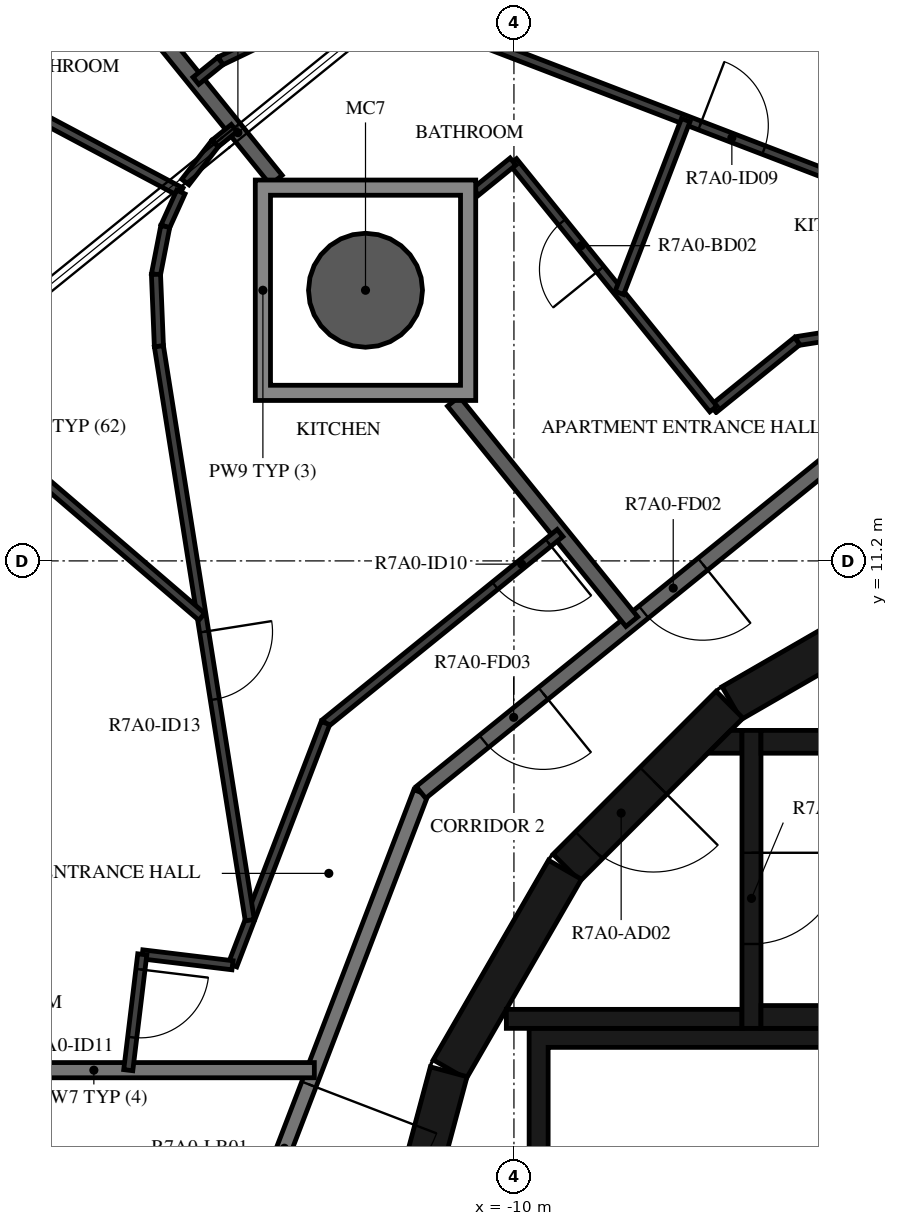
"""IFC4 building model, lengths in metres.
Left out: names, types, materials, properties, quantities, classifications, styles, units other than length and angle.
Written with IfcOpenShell. Run it as: python <this file> out.ifc"""

import sys

from ifc_helpers import new_model, si_unit, direction, frame, frame_2d, origin, origin_2d, place, context, subcontext, project, spatial, polyline, rectangle, hollow_circle, outline, extrude, element, fill, save


model = new_model("IFC4")
c1 = context("Model", 3, precision=1e-05, world=origin(), true_north=direction((0.0, 1.0)))
c2 = subcontext(c1, "Body", "Model", "MODEL_VIEW")
j1 = project(units=[si_unit("LENGTHUNIT", "METRE"), si_unit("PLANEANGLEUNIT", "RADIAN")], contexts=[c1])
p1 = place(None, origin())
s1 = spatial("IfcSite", under=j1, at=p1, CompositionType="ELEMENT")
p2 = place(p1, origin())
s2 = spatial("IfcBuilding", under=s1, at=p2, CompositionType="ELEMENT")
p3 = place(p2, frame((0.0, 0.0, 270.4)))
s3 = spatial("IfcBuildingStorey", under=s2, at=p3, CompositionType="ELEMENT", Elevation=270.4)
p4 = place(p3, frame((-11.953, 14.76, -0.38), z_axis=(0.0, 0.0, 1.0), x_axis=(1.0, 0.0, 0.0)))
e1 = element("IfcColumn", 1, at=p4, inside=s3, PredefinedType="COLUMN", context=c2, shape_type="SweptSolid", body=[
    extrude(hollow_circle(Radius=0.75, WallThickness=0.035, at=origin_2d()), origin(), (0.0, 0.0, 1.0), 3.5),
])
p5 = place(p3, frame((-4.51, 10.845, 0.0), z_axis=(0.0, 0.0, 1.0), x_axis=(-0.865975092491, -0.500087131594, 0.0)))
e2 = element("IfcWall", 2, at=p5, inside=s3, PredefinedType="SHEAR", context=c2, shape_type="SweptSolid", body=[
    extrude(rectangle(XDim=3.033, YDim=0.5, at=frame_2d((1.516, 0.0))), origin(), (0.0, 0.0, 1.0), 3.12),
])
p6 = place(p3, frame((-7.164, 9.308, 0.0), z_axis=(0.0, 0.0, 1.0), x_axis=(-0.707106781187, -0.707106781187, 0.0)))
e3 = element("IfcWall", 3, at=p6, inside=s3, PredefinedType="SHEAR", context=c2, shape_type="SweptSolid", body=[
    extrude(rectangle(XDim=3.032, YDim=0.5, at=frame_2d((1.516, 0.0))), origin(), (0.0, 0.0, 1.0), 3.12),
])
p7 = place(p6, frame((1.416, 0.0, 0.0)))
e4 = element("IfcOpeningElement", 4, at=p7, cuts=e3, PredefinedType="OPENING", context=c2, shape_type="SweptSolid", body=[
    extrude(rectangle(XDim=1.2, YDim=2.1, at=frame_2d((0.6, 1.05))), frame((0.0, 0.26, 0.0), z_axis=(0.0, -1.0, 0.0), x_axis=(1.0, 0.0, 0.0)), (0.0, 0.0, 1.0), 0.52),
])
for number, where, z_axis, x_axis in (
    (5, (-9.329, 7.137, 0.0), (0.0, 0.0, 1.0), (-0.5, -0.866, 0.0)),
    (6, (-10.858, 4.479, 0.0), (0.0, 0.0, 1.0), (-0.259, -0.966, 0.0)),
):
    element("IfcWall", number, at=place(p3, frame(where, z_axis=z_axis, x_axis=x_axis)), inside=s3, PredefinedType="SHEAR", context=c2, shape_type="SweptSolid", body=[
        extrude(rectangle(XDim=3.033, YDim=0.5, at=frame_2d((1.516, 0.0))), origin(), (0.0, 0.0, 1.0), 3.12),
    ])
for number, where, z_axis, x_axis in (
    (7, (-6.75, 5.2, 0.0), (0.0, 0.0, 1.0), (1.0, 0.0, 0.0)),
    (8, (-6.75, 8.82, 0.0), (0.0, 0.0, 1.0), (1.0, 0.0, 0.0)),
):
    element("IfcWall", number, at=place(p3, frame(where, z_axis=z_axis, x_axis=x_axis)), inside=s3, PredefinedType="SHEAR", context=c2, shape_type="SweptSolid", body=[
        extrude(rectangle(XDim=6.75, YDim=0.3, at=frame_2d((3.375, 0.0))), origin(), (0.0, 0.0, 1.0), 3.12),
    ])
p8 = place(p3, frame((-6.875, 8.97, 0.0), z_axis=(0.0, 0.0, 1.0), x_axis=(0.0, -1.0, 0.0)))
e9 = element("IfcWall", 9, at=p8, inside=s3, PredefinedType="SHEAR", context=c2, shape_type="SweptSolid", body=[
    extrude(rectangle(XDim=3.92, YDim=0.25, at=frame_2d((1.96, 0.0))), origin(), (0.0, 0.0, 1.0), 3.12),
])
p9 = place(p8, frame((1.61, 0.0, 0.0)))
e10 = element("IfcOpeningElement", 10, at=p9, cuts=e9, PredefinedType="OPENING", context=c2, shape_type="SweptSolid", body=[
    extrude(rectangle(XDim=1.2, YDim=2.1, at=frame_2d((0.6, 1.05))), frame((0.0, 0.135, 0.0), z_axis=(0.0, -1.0, 0.0), x_axis=(1.0, 0.0, 0.0)), (0.0, 0.0, 1.0), 0.27),
])
p10 = place(p3, frame((-7.0, 5.175, 0.0), z_axis=(0.0, 0.0, 1.0), x_axis=(-1.0, 0.0, 0.0)))
e11 = element("IfcWall", 11, at=p10, inside=s3, PredefinedType="SHEAR", context=c2, shape_type="SweptSolid", body=[
    extrude(rectangle(XDim=3.1, YDim=0.25, at=frame_2d((1.55, 0.0))), origin(), (0.0, 0.0, 1.0), 3.12),
])
p11 = place(p3, origin())
e12 = element("IfcWall", 12, at=p11, inside=s3, PredefinedType="SHEAR", context=c2, shape_type="SweptSolid", body=[
    extrude(outline(polyline([(-7.148, 8.97), (-7.0, 8.97), (-7.0, 8.67), (-7.448, 8.67), (-7.148, 8.97)])), origin(), (0.0, 0.0, 1.0), 3.12),
])
p12 = place(p3, origin())
e13 = element("IfcWall", 13, at=p12, inside=s3, PredefinedType="SHEAR", context=c2, shape_type="SweptSolid", body=[
    extrude(outline(polyline([(-9.8, 1.9), (-9.55, 1.9), (-9.55, 4.8), (3.1, 4.8), (3.1, 1.9), (3.35, 1.9), (3.35, 4.8), (5.25, 4.8), (5.25, 1.9), (5.5, 1.9), (5.5, 4.8), (7.4, 4.8), (7.4, 1.9), (7.65, 1.9), (7.65, 4.8), (9.55, 4.8), (9.55, 1.9), (9.8, 1.9), (9.8, 4.8), (9.8, 5.05), (-9.8, 5.05), (-9.8, 4.8), (-9.8, 1.9)])), origin(), (0.0, 0.0, 1.0), 3.12),
])
p13 = place(p3, frame((-11.223, 8.154, 0.0), z_axis=(0.0, 0.0, 1.0), x_axis=(-0.358341090983, -0.93359073609, 0.0)))
e14 = element("IfcWall", 14, at=p13, inside=s3, PredefinedType="STANDARD", context=c2, shape_type="SweptSolid", body=[
    extrude(rectangle(XDim=7.181, YDim=0.2, at=frame_2d((3.59, 0.0))), origin(), (0.0, 0.0, 1.0), 3.12),
])
p14 = place(p13, frame((4.114, 0.0, 0.0)))
e15 = element("IfcOpeningElement", 15, at=p14, cuts=e14, PredefinedType="OPENING", context=c2, shape_type="SweptSolid", body=[
    extrude(rectangle(XDim=1.8, YDim=2.1, at=frame_2d((0.9, 1.05))), frame((0.0, 0.11, 0.0), z_axis=(0.0, -1.0, 0.0), x_axis=(1.0, 0.0, 0.0)), (0.0, 0.0, 1.0), 0.22),
])
p15 = place(p3, frame((-5.643, 12.673, 0.0), z_axis=(0.0, 0.0, 1.0), x_axis=(-0.777160148113, -0.629302871585, 0.0)))
e16 = element("IfcWall", 16, at=p15, inside=s3, PredefinedType="STANDARD", context=c2, shape_type="SweptSolid", body=[
    extrude(rectangle(XDim=7.181, YDim=0.2, at=frame_2d((3.59, 0.0))), origin(), (0.0, 0.0, 1.0), 3.12),
])
p16 = place(p15, frame((2.41, 0.0, 0.0)))
e17 = element("IfcOpeningElement", 17, at=p16, cuts=e16, PredefinedType="OPENING", context=c2, shape_type="SweptSolid", body=[
    extrude(rectangle(XDim=1.0, YDim=2.1, at=frame_2d((0.5, 1.05))), frame((0.0, 0.11, 0.0), z_axis=(0.0, -1.0, 0.0), x_axis=(1.0, 0.0, 0.0)), (0.0, 0.0, 1.0), 0.22),
])
p17 = place(p15, frame((5.112, 0.0, 0.0)))
e18 = element("IfcOpeningElement", 18, at=p17, cuts=e16, PredefinedType="OPENING", context=c2, shape_type="SweptSolid", body=[
    extrude(rectangle(XDim=1.0, YDim=2.1, at=frame_2d((0.5, 1.05))), frame((0.0, 0.11, 0.0), z_axis=(0.0, -1.0, 0.0), x_axis=(1.0, 0.0, 0.0)), (0.0, 0.0, 1.0), 0.22),
])
p18 = place(p3, frame((-12.626, 4.5, 0.0), z_axis=(0.0, 0.0, 1.0), x_axis=(-1.0, 0.0, 0.0)))
e19 = element("IfcWall", 19, at=p18, inside=s3, PredefinedType="STANDARD", context=c2, shape_type="SweptSolid", body=[
    extrude(rectangle(XDim=5.802, YDim=0.2, at=frame_2d((2.901, 0.0))), origin(), (0.0, 0.0, 1.0), 3.12),
])
p19 = place(p3, frame((-10.796, 13.299, 0.0), z_axis=(0.0, 0.0, 1.0), x_axis=(0.629290499381, -0.777170166301, 0.0)))
e20 = element("IfcWall", 20, at=p19, inside=s3, PredefinedType="STANDARD", context=c2, shape_type="SweptSolid", body=[
    extrude(rectangle(XDim=3.729, YDim=0.2, at=frame_2d((1.865, 0.0))), origin(), (0.0, 0.0, 1.0), 3.12),
])
p20 = place(p3, frame((-16.953, 20.936, 0.0), z_axis=(0.0, 0.0, 1.0), x_axis=(0.629331057166, -0.777137324085, 0.0)))
e21 = element("IfcWall", 21, at=p20, inside=s3, PredefinedType="STANDARD", context=c2, shape_type="SweptSolid", body=[
    extrude(rectangle(XDim=6.08, YDim=0.2, at=frame_2d((3.04, 0.0))), origin(), (0.0, 0.0, 1.0), 3.12),
])
p21 = place(p3, frame((1.612, 15.341, 0.0), z_axis=(0.0, 0.0, 1.0), x_axis=(-0.987689722749, -0.156425738216, 0.0)))
e22 = element("IfcWall", 22, at=p21, inside=s3, PredefinedType="PARTITIONING", context=c2, shape_type="SweptSolid", body=[
    extrude(rectangle(XDim=7.985, YDim=0.12, at=frame_2d((3.992, 0.0))), origin(), (0.0, 0.0, 1.0), 3.12),
])
p22 = place(p21, frame((1.295, 0.0, 0.0)))
e23 = element("IfcOpeningElement", 23, at=p22, cuts=e22, PredefinedType="OPENING", context=c2, shape_type="SweptSolid", body=[
    extrude(rectangle(XDim=0.9, YDim=2.1, at=frame_2d((0.45, 1.05))), frame((0.0, 0.07, 0.0), z_axis=(0.0, -1.0, 0.0), x_axis=(1.0, 0.0, 0.0)), (0.0, 0.0, 1.0), 0.14),
])
p23 = place(p21, frame((5.107, 0.0, 0.0)))
e24 = element("IfcOpeningElement", 24, at=p23, cuts=e22, PredefinedType="OPENING", context=c2, shape_type="SweptSolid", body=[
    extrude(rectangle(XDim=0.9, YDim=2.1, at=frame_2d((0.45, 1.05))), frame((0.0, 0.07, 0.0), z_axis=(0.0, -1.0, 0.0), x_axis=(1.0, 0.0, 0.0)), (0.0, 0.0, 1.0), 0.14),
])
p24 = place(p3, frame((-6.274, 14.092, 0.0), z_axis=(0.0, 0.0, 1.0), x_axis=(-0.777144673245, -0.629321981855, 0.0)))
e25 = element("IfcWall", 25, at=p24, inside=s3, PredefinedType="PARTITIONING", context=c2, shape_type="SweptSolid", body=[
    extrude(rectangle(XDim=1.419, YDim=0.12, at=frame_2d((0.709, 0.0))), origin(), (0.0, 0.0, 1.0), 3.12),
])
p25 = place(p3, frame((-7.377, 13.199, 0.0), z_axis=(0.0, 0.0, 1.0), x_axis=(-0.629382670352, 0.77709552454, 0.0)))
e26 = element("IfcWall", 26, at=p25, inside=s3, PredefinedType="PARTITIONING", context=c2, shape_type="SweptSolid", body=[
    extrude(rectangle(XDim=4.188, YDim=0.12, at=frame_2d((2.094, 0.0))), origin(), (0.0, 0.0, 1.0), 3.12),
])
p26 = place(p25, frame((2.364, 0.0, 0.0)))
e27 = element("IfcOpeningElement", 27, at=p26, cuts=e26, PredefinedType="OPENING", context=c2, shape_type="SweptSolid", body=[
    extrude(rectangle(XDim=0.8, YDim=2.1, at=frame_2d((0.4, 1.05))), frame((0.0, 0.07, 0.0), z_axis=(0.0, -1.0, 0.0), x_axis=(1.0, 0.0, 0.0)), (0.0, 0.0, 1.0), 0.14),
])
p27 = place(p3, frame((-10.013, 16.454, 0.0), z_axis=(0.0, 0.0, 1.0), x_axis=(-0.777001388062, -0.629498882406, 0.0)))
e28 = element("IfcWall", 28, at=p27, inside=s3, PredefinedType="PARTITIONING", context=c2, shape_type="SweptSolid", body=[
    extrude(rectangle(XDim=0.631, YDim=0.12, at=frame_2d((0.315, 0.0))), origin(), (0.0, 0.0, 1.0), 3.12),
])
p28 = place(p3, frame((-10.289, 17.978, 0.0), z_axis=(0.0, 0.0, 1.0), x_axis=(0.933579293595, -0.358370900844, 0.0)))
e29 = element("IfcWall", 29, at=p28, inside=s3, PredefinedType="PARTITIONING", context=c2, shape_type="SweptSolid", body=[
    extrude(rectangle(XDim=8.932, YDim=0.12, at=frame_2d((4.466, 0.0))), origin(), (0.0, 0.0, 1.0), 3.12),
])
p29 = place(p28, frame((2.93, 0.0, 0.0)))
e30 = element("IfcOpeningElement", 30, at=p29, cuts=e29, PredefinedType="OPENING", context=c2, shape_type="SweptSolid", body=[
    extrude(rectangle(XDim=0.9, YDim=2.1, at=frame_2d((0.45, 1.05))), frame((0.0, 0.07, 0.0), z_axis=(0.0, -1.0, 0.0), x_axis=(1.0, 0.0, 0.0)), (0.0, 0.0, 1.0), 0.14),
])
p30 = place(p3, frame((-7.74, 17.0, 0.0), z_axis=(0.0, 0.0, 1.0), x_axis=(-0.358394723652, -0.93357014844, 0.0)))
e31 = element("IfcWall", 31, at=p30, inside=s3, PredefinedType="PARTITIONING", context=c2, shape_type="SweptSolid", body=[
    extrude(rectangle(XDim=2.436, YDim=0.12, at=frame_2d((1.218, 0.0))), origin(), (0.0, 0.0, 1.0), 3.12),
])
p31 = place(p3, frame((-13.115, 18.136, 0.0), z_axis=(0.0, 0.0, 1.0), x_axis=(-0.901385111422, -0.43301833784, 0.0)))
e32 = element("IfcWall", 32, at=p31, inside=s3, PredefinedType="PARTITIONING", context=c2, shape_type="SweptSolid", body=[
    extrude(rectangle(XDim=0.829, YDim=0.12, at=frame_2d((0.415, 0.0))), origin(), (0.0, 0.0, 1.0), 3.12),
])
p32 = place(p3, frame((-13.862, 17.777, 0.0), z_axis=(0.0, 0.0, 1.0), x_axis=(-0.776888119785, -0.629638665694, 0.0)))
e33 = element("IfcWall", 33, at=p32, inside=s3, PredefinedType="PARTITIONING", context=c2, shape_type="SweptSolid", body=[
    extrude(rectangle(XDim=0.415, YDim=0.12, at=frame_2d((0.207, 0.0))), origin(), (0.0, 0.0, 1.0), 3.12),
])
p33 = place(p3, frame((-9.393, 11.566, 0.0), z_axis=(0.0, 0.0, 1.0), x_axis=(-0.777100258587, -0.629376825205, 0.0)))
e34 = element("IfcWall", 34, at=p33, inside=s3, PredefinedType="PARTITIONING", context=c2, shape_type="SweptSolid", body=[
    extrude(rectangle(XDim=3.971, YDim=0.12, at=frame_2d((1.986, 0.0))), origin(), (0.0, 0.0, 1.0), 3.12),
])
p34 = place(p33, frame((0.2, 0.0, 0.0)))
e35 = element("IfcOpeningElement", 35, at=p34, cuts=e34, PredefinedType="OPENING", context=c2, shape_type="SweptSolid", body=[
    extrude(rectangle(XDim=0.9, YDim=2.1, at=frame_2d((0.45, 1.05))), frame((0.0, 0.07, 0.0), z_axis=(0.0, -1.0, 0.0), x_axis=(1.0, 0.0, 0.0)), (0.0, 0.0, 1.0), 0.14),
])
p35 = place(p3, frame((-12.479, 9.067, 0.0), z_axis=(0.0, 0.0, 1.0), x_axis=(-0.358394302064, -0.933570310286, 0.0)))
e36 = element("IfcWall", 36, at=p35, inside=s3, PredefinedType="PARTITIONING", context=c2, shape_type="SweptSolid", body=[
    extrude(rectangle(XDim=3.414, YDim=0.12, at=frame_2d((1.707, 0.0))), origin(), (0.0, 0.0, 1.0), 3.12),
])
p36 = place(p3, frame((-13.703, 5.88, 0.0), z_axis=(0.0, 0.0, 1.0), x_axis=(-0.992763323859, 0.120087396509, 0.0)))
e37 = element("IfcWall", 37, at=p36, inside=s3, PredefinedType="PARTITIONING", context=c2, shape_type="SweptSolid", body=[
    extrude(rectangle(XDim=1.195, YDim=0.12, at=frame_2d((0.598, 0.0))), origin(), (0.0, 0.0, 1.0), 3.12),
])
p37 = place(p3, frame((-14.89, 6.024, 0.0), z_axis=(0.0, 0.0, 1.0), x_axis=(-0.120255360044, -0.992742992109, 0.0)))
e38 = element("IfcWall", 38, at=p37, inside=s3, PredefinedType="PARTITIONING", context=c2, shape_type="SweptSolid", body=[
    extrude(rectangle(XDim=1.535, YDim=0.12, at=frame_2d((0.768, 0.0))), origin(), (0.0, 0.0, 1.0), 3.12),
])
p38 = place(p37, frame((0.2, 0.0, 0.0)))
e39 = element("IfcOpeningElement", 39, at=p38, cuts=e38, PredefinedType="OPENING", context=c2, shape_type="SweptSolid", body=[
    extrude(rectangle(XDim=0.9, YDim=2.1, at=frame_2d((0.45, 1.05))), frame((0.0, 0.07, 0.0), z_axis=(0.0, -1.0, 0.0), x_axis=(1.0, 0.0, 0.0)), (0.0, 0.0, 1.0), 0.14),
])
p39 = place(p3, frame((-14.323, 16.184, 0.0), z_axis=(0.0, 0.0, 1.0), x_axis=(0.611198506308, 0.791477343887, 0.0)))
e40 = element("IfcWall", 40, at=p39, inside=s3, PredefinedType="PARTITIONING", context=c2, shape_type="SweptSolid", body=[
    extrude(rectangle(XDim=0.642, YDim=0.12, at=frame_2d((0.321, 0.0))), origin(), (0.0, 0.0, 1.0), 3.12),
])
p40 = place(p3, frame((-13.93, 16.692, 0.0), z_axis=(0.0, 0.0, 1.0), x_axis=(0.776695397137, 0.62987638475, 0.0)))
e41 = element("IfcWall", 41, at=p40, inside=s3, PredefinedType="PARTITIONING", context=c2, shape_type="SweptSolid", body=[
    extrude(rectangle(XDim=0.321, YDim=0.12, at=frame_2d((0.161, 0.0))), origin(), (0.0, 0.0, 1.0), 3.12),
])
p41 = place(p3, frame((-18.983, 18.499, 0.0), z_axis=(0.0, 0.0, 1.0), x_axis=(0.882948840489, -0.469469216328, 0.0)))
e42 = element("IfcWall", 42, at=p41, inside=s3, PredefinedType="PARTITIONING", context=c2, shape_type="SweptSolid", body=[
    extrude(rectangle(XDim=5.211, YDim=0.12, at=frame_2d((2.605, 0.0))), origin(), (0.0, 0.0, 1.0), 2.73),
])
p42 = place(p41, frame((0.2, 0.0, 0.0)))
e43 = element("IfcOpeningElement", 43, at=p42, cuts=e42, PredefinedType="OPENING", context=c2, shape_type="SweptSolid", body=[
    extrude(rectangle(XDim=0.8, YDim=2.1, at=frame_2d((0.4, 1.05))), frame((0.0, 0.07, 0.0), z_axis=(0.0, -1.0, 0.0), x_axis=(1.0, 0.0, 0.0)), (0.0, 0.0, 1.0), 0.14),
])
p43 = place(p3, frame((-14.382, 16.052, 0.0), z_axis=(0.0, 0.0, 1.0), x_axis=(-0.412099912529, -0.911138662385, 0.0)))
e44 = element("IfcWall", 44, at=p43, inside=s3, PredefinedType="PARTITIONING", context=c2, shape_type="SweptSolid", body=[
    extrude(rectangle(XDim=0.497, YDim=0.12, at=frame_2d((0.249, 0.0))), origin(), (0.0, 0.0, 1.0), 3.12),
])
p44 = place(p3, frame((-14.587, 15.6, 0.0), z_axis=(0.0, 0.0, 1.0), x_axis=(-0.190920556667, -0.98160549155, 0.0)))
e45 = element("IfcWall", 45, at=p44, inside=s3, PredefinedType="PARTITIONING", context=c2, shape_type="SweptSolid", body=[
    extrude(rectangle(XDim=0.642, YDim=0.12, at=frame_2d((0.321, 0.0))), origin(), (0.0, 0.0, 1.0), 3.12),
])
p45 = place(p3, frame((-14.709, 14.969, 0.0), z_axis=(0.0, 0.0, 1.0), x_axis=(0.040729848009, -0.999170195453, 0.0)))
e46 = element("IfcWall", 46, at=p45, inside=s3, PredefinedType="PARTITIONING", context=c2, shape_type="SweptSolid", body=[
    extrude(rectangle(XDim=0.947, YDim=0.12, at=frame_2d((0.474, 0.0))), origin(), (0.0, 0.0, 1.0), 3.12),
])
p46 = place(p3, frame((-14.671, 14.023, 0.0), z_axis=(0.0, 0.0, 1.0), x_axis=(0.156438190471, -0.987687750538, 0.0)))
e47 = element("IfcWall", 47, at=p46, inside=s3, PredefinedType="PARTITIONING", context=c2, shape_type="SweptSolid", body=[
    extrude(rectangle(XDim=7.644, YDim=0.12, at=frame_2d((3.822, 0.0))), origin(), (0.0, 0.0, 1.0), 3.12),
])
p47 = place(p46, frame((3.803, 0.0, 0.0)))
e48 = element("IfcOpeningElement", 48, at=p47, cuts=e47, PredefinedType="OPENING", context=c2, shape_type="SweptSolid", body=[
    extrude(rectangle(XDim=0.9, YDim=2.1, at=frame_2d((0.45, 1.05))), frame((0.0, 0.07, 0.0), z_axis=(0.0, -1.0, 0.0), x_axis=(1.0, 0.0, 0.0)), (0.0, 0.0, 1.0), 0.14),
])
p48 = place(p3, frame((-19.913, 15.451, 0.0), z_axis=(0.0, 0.0, 1.0), x_axis=(0.758623462992, -0.6515293097, 0.0)))
e49 = element("IfcWall", 49, at=p48, inside=s3, PredefinedType="PARTITIONING", context=c2, shape_type="SweptSolid", body=[
    extrude(rectangle(XDim=7.653, YDim=0.12, at=frame_2d((3.826, 0.0))), origin(), (0.0, 0.0, 1.0), 3.12),
])
p49 = place(p48, frame((0.7, 0.0, 0.0)))
e50 = element("IfcOpeningElement", 50, at=p49, cuts=e49, PredefinedType="OPENING", context=c2, shape_type="SweptSolid", body=[
    extrude(rectangle(XDim=0.9, YDim=2.1, at=frame_2d((0.45, 1.05))), frame((0.0, 0.07, 0.0), z_axis=(0.0, -1.0, 0.0), x_axis=(1.0, 0.0, 0.0)), (0.0, 0.0, 1.0), 0.14),
])
p50 = place(p3, origin())
e51 = element("IfcWall", 51, at=p50, inside=s3, PredefinedType="STANDARD", context=c2, shape_type="SweptSolid", body=[
    extrude(outline(polyline([(-10.503, 16.21), (-10.503, 13.311), (-13.403, 13.311), (-13.403, 16.21), (-10.503, 16.21)]), holes=[polyline([(-13.203, 13.51), (-10.703, 13.51), (-10.703, 16.01), (-13.203, 16.01), (-13.203, 13.51)])]), origin(), (0.0, 0.0, 1.0), 3.12),
])
p51 = place(p9, origin())
e52 = element("IfcDoor", 52, at=p51, inside=s3, OperationType="SINGLE_SWING_LEFT", PredefinedType="DOOR", context=c2, shape_type="SweptSolid", body=[
    extrude(rectangle(XDim=1.2, YDim=2.1, at=frame_2d((0.6, 1.05))), frame((0.0, 0.025, 0.0), z_axis=(0.0, -1.0, 0.0), x_axis=(1.0, 0.0, 0.0)), (0.0, 0.0, 1.0), 0.05),
])
fill(e10, e52)
p52 = place(p7, origin())
e53 = element("IfcDoor", 53, at=p52, inside=s3, OperationType="SINGLE_SWING_RIGHT", PredefinedType="DOOR", context=c2, shape_type="SweptSolid", body=[
    extrude(rectangle(XDim=1.2, YDim=2.1, at=frame_2d((0.6, 1.05))), frame((0.0, 0.025, 0.0), z_axis=(0.0, -1.0, 0.0), x_axis=(1.0, 0.0, 0.0)), (0.0, 0.0, 1.0), 0.05),
])
fill(e4, e53)
p53 = place(p16, origin())
e54 = element("IfcDoor", 54, at=p53, inside=s3, OperationType="SINGLE_SWING_RIGHT", PredefinedType="DOOR", context=c2, shape_type="SweptSolid", body=[
    extrude(rectangle(XDim=1.0, YDim=2.1, at=frame_2d((0.5, 1.05))), frame((0.0, 0.025, 0.0), z_axis=(0.0, -1.0, 0.0), x_axis=(1.0, 0.0, 0.0)), (0.0, 0.0, 1.0), 0.05),
])
fill(e17, e54)
p54 = place(p26, origin())
e55 = element("IfcDoor", 55, at=p54, inside=s3, OperationType="SINGLE_SWING_RIGHT", PredefinedType="DOOR", context=c2, shape_type="SweptSolid", body=[
    extrude(rectangle(XDim=0.8, YDim=2.1, at=frame_2d((0.4, 1.05))), frame((0.0, 0.025, 0.0), z_axis=(0.0, -1.0, 0.0), x_axis=(1.0, 0.0, 0.0)), (0.0, 0.0, 1.0), 0.05),
])
fill(e27, e55)
p55 = place(p29, origin())
e56 = element("IfcDoor", 56, at=p55, inside=s3, OperationType="SINGLE_SWING_LEFT", PredefinedType="DOOR", context=c2, shape_type="SweptSolid", body=[
    extrude(rectangle(XDim=0.9, YDim=2.1, at=frame_2d((0.45, 1.05))), frame((0.0, 0.025, 0.0), z_axis=(0.0, -1.0, 0.0), x_axis=(1.0, 0.0, 0.0)), (0.0, 0.0, 1.0), 0.05),
])
fill(e30, e56)
p56 = place(p17, origin())
e57 = element("IfcDoor", 57, at=p56, inside=s3, OperationType="SINGLE_SWING_LEFT", PredefinedType="DOOR", context=c2, shape_type="SweptSolid", body=[
    extrude(rectangle(XDim=1.0, YDim=2.1, at=frame_2d((0.5, 1.05))), frame((0.0, 0.025, 0.0), z_axis=(0.0, -1.0, 0.0), x_axis=(1.0, 0.0, 0.0)), (0.0, 0.0, 1.0), 0.05),
])
fill(e18, e57)
p57 = place(p34, origin())
e58 = element("IfcDoor", 58, at=p57, inside=s3, OperationType="SINGLE_SWING_LEFT", PredefinedType="DOOR", context=c2, shape_type="SweptSolid", body=[
    extrude(rectangle(XDim=0.9, YDim=2.1, at=frame_2d((0.45, 1.05))), frame((0.0, 0.025, 0.0), z_axis=(0.0, -1.0, 0.0), x_axis=(1.0, 0.0, 0.0)), (0.0, 0.0, 1.0), 0.05),
])
fill(e35, e58)
p58 = place(p38, origin())
e59 = element("IfcDoor", 59, at=p58, inside=s3, OperationType="SINGLE_SWING_LEFT", PredefinedType="DOOR", context=c2, shape_type="SweptSolid", body=[
    extrude(rectangle(XDim=0.9, YDim=2.1, at=frame_2d((0.45, 1.05))), frame((0.0, 0.025, 0.0), z_axis=(0.0, -1.0, 0.0), x_axis=(1.0, 0.0, 0.0)), (0.0, 0.0, 1.0), 0.05),
])
fill(e39, e59)
p59 = place(p47, origin())
e60 = element("IfcDoor", 60, at=p59, inside=s3, OperationType="SINGLE_SWING_RIGHT", PredefinedType="DOOR", context=c2, shape_type="SweptSolid", body=[
    extrude(rectangle(XDim=0.9, YDim=2.1, at=frame_2d((0.45, 1.05))), frame((0.0, 0.025, 0.0), z_axis=(0.0, -1.0, 0.0), x_axis=(1.0, 0.0, 0.0)), (0.0, 0.0, 1.0), 0.05),
])
fill(e48, e60)
p60 = place(p14, origin())
e61 = element("IfcDoor", 61, at=p60, inside=s3, OperationType="DOUBLE_DOOR_SINGLE_SWING", PredefinedType="DOOR", context=c2, shape_type="SweptSolid", body=[
    extrude(rectangle(XDim=1.8, YDim=2.1, at=frame_2d((0.9, 1.05))), frame((0.0, 0.025, 0.0), z_axis=(0.0, -1.0, 0.0), x_axis=(1.0, 0.0, 0.0)), (0.0, 0.0, 1.0), 0.05),
])
fill(e15, e61)
save(model, sys.argv[1])
